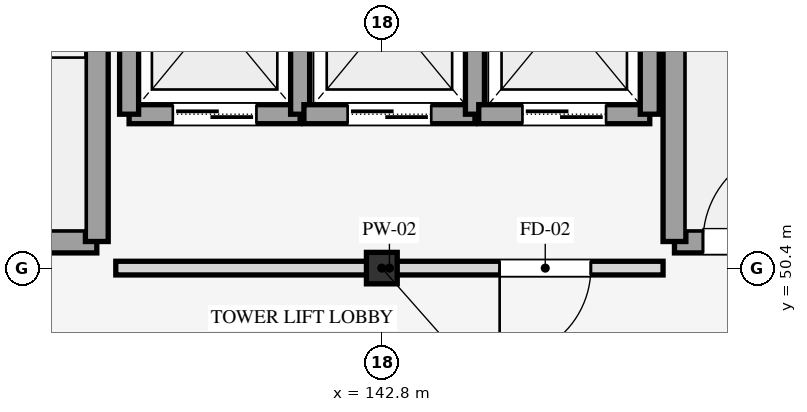
"""IFC4 building model, lengths in metres.
Left out: names, types, materials, properties, quantities, classifications, styles, units other than length and angle.
Written with IfcOpenShell. Run it as: python <this file> out.ifc"""

import sys

from ifc_helpers import new_model, si_unit, direction, frame, frame_2d, origin, origin_2d, place, context, subcontext, project, spatial, rectangle, i_section, extrude, element, fill, save


model = new_model("IFC4")
c1 = context("Model", 3, precision=1e-05, world=origin(), true_north=direction((0.0, 1.0)))
c2 = subcontext(c1, "Body", "Model", "MODEL_VIEW")
j1 = project(units=[si_unit("LENGTHUNIT", "METRE"), si_unit("PLANEANGLEUNIT", "RADIAN")], contexts=[c1])
p1 = place(None, origin())
s1 = spatial("IfcSite", under=j1, at=p1, CompositionType="ELEMENT")
p2 = place(p1, origin())
s2 = spatial("IfcBuilding", under=s1, at=p2, CompositionType="ELEMENT")
p3 = place(p2, frame((0.0, 0.0, 9.9)))
s3 = spatial("IfcBuildingStorey", under=s2, at=p3, CompositionType="ELEMENT", Elevation=9.9)
p4 = place(p3, frame((142.8, 50.4, 0.0), z_axis=(0.0, 0.0, 1.0), x_axis=(1.0, 0.0, 0.0)))
e1 = element("IfcColumn", 1, at=p4, inside=s3, PredefinedType="COLUMN", context=c2, shape_type="SweptSolid", body=[
    extrude(i_section(OverallWidth=0.405, OverallDepth=0.414, WebThickness=0.018, FlangeThickness=0.028, FilletRadius=0.022, at=origin_2d()), origin(), (0.0, 0.0, 1.0), 4.5),
])
p5 = place(p3, frame((135.05, 50.75, 0.0), z_axis=(0.0, 0.0, 1.0), x_axis=(1.0, 0.0, 0.0)))
e2 = element("IfcWall", 2, at=p5, inside=s3, PredefinedType="SHEAR", context=c2, shape_type="SweptSolid", body=[
    extrude(rectangle(XDim=4.0, YDim=0.3, at=frame_2d((2.0, 0.0))), origin(), (0.0, 0.0, 1.0), 4.5),
])
p6 = place(p5, frame((0.375, 0.0, 0.0)))
e3 = element("IfcOpeningElement", 3, at=p6, cuts=e2, PredefinedType="OPENING", context=c2, shape_type="SweptSolid", body=[
    extrude(rectangle(XDim=1.25, YDim=2.15, at=frame_2d((0.625, 1.075))), frame((0.0, 0.16, 0.0), z_axis=(0.0, -1.0, 0.0), x_axis=(1.0, 0.0, 0.0)), (0.0, 0.0, 1.0), 0.32),
])
p7 = place(p3, frame((139.05, 50.75, 0.0), z_axis=(0.0, 0.0, 1.0), x_axis=(0.0, 1.0, 0.0)))
e4 = element("IfcWall", 4, at=p7, inside=s3, PredefinedType="SHEAR", context=c2, shape_type="SweptSolid", body=[
    extrude(rectangle(XDim=14.3, YDim=0.3, at=frame_2d((7.15, 0.0))), origin(), (0.0, 0.0, 1.0), 4.5),
])
p8 = place(p3, frame((146.65, 50.75, 0.0), z_axis=(0.0, 0.0, 1.0), x_axis=(1.0, 0.0, 0.0)))
e5 = element("IfcWall", 5, at=p8, inside=s3, PredefinedType="SHEAR", context=c2, shape_type="SweptSolid", body=[
    extrude(rectangle(XDim=4.0, YDim=0.3, at=frame_2d((2.0, 0.0))), origin(), (0.0, 0.0, 1.0), 4.5),
])
p9 = place(p8, frame((0.375, 0.0, 0.0)))
e6 = element("IfcOpeningElement", 6, at=p9, cuts=e5, PredefinedType="OPENING", context=c2, shape_type="SweptSolid", body=[
    extrude(rectangle(XDim=1.25, YDim=2.15, at=frame_2d((0.625, 1.075))), frame((0.0, 0.16, 0.0), z_axis=(0.0, -1.0, 0.0), x_axis=(1.0, 0.0, 0.0)), (0.0, 0.0, 1.0), 0.32),
])
p10 = place(p3, frame((146.65, 50.75, 0.0), z_axis=(0.0, 0.0, 1.0), x_axis=(0.0, 1.0, 0.0)))
e7 = element("IfcWall", 7, at=p10, inside=s3, PredefinedType="SHEAR", context=c2, shape_type="SweptSolid", body=[
    extrude(rectangle(XDim=14.3, YDim=0.3, at=frame_2d((7.15, 0.0))), origin(), (0.0, 0.0, 1.0), 4.5),
])
p11 = place(p3, frame((139.475, 52.425, 0.0), z_axis=(0.0, 0.0, 1.0), x_axis=(1.0, 0.0, 0.0)))
e8 = element("IfcWall", 8, at=p11, inside=s3, PredefinedType="SHEAR", context=c2, shape_type="SweptSolid", body=[
    extrude(rectangle(XDim=2.25, YDim=0.25, at=frame_2d((1.125, 0.0))), origin(), (0.0, 0.0, 1.0), 4.24),
])
p12 = place(p11, frame((0.575, 0.0, 0.0)))
e9 = element("IfcOpeningElement", 9, at=p12, cuts=e8, PredefinedType="OPENING", context=c2, shape_type="SweptSolid", body=[
    extrude(rectangle(XDim=1.1, YDim=2.15, at=frame_2d((0.55, 1.075))), frame((0.0, 0.135, 0.0), z_axis=(0.0, -1.0, 0.0), x_axis=(1.0, 0.0, 0.0)), (0.0, 0.0, 1.0), 0.27),
])
for number, where, z_axis, x_axis in (
    (10, (139.475, 52.425, 0.0), (0.0, 0.0, 1.0), (0.0, 1.0, 0.0)),
    (11, (141.725, 52.425, 0.0), (0.0, 0.0, 1.0), (0.0, 1.0, 0.0)),
):
    element("IfcWall", number, at=place(p3, frame(where, z_axis=z_axis, x_axis=x_axis)), inside=s3, PredefinedType="SHEAR", context=c2, shape_type="SweptSolid", body=[
        extrude(rectangle(XDim=2.65, YDim=0.25, at=frame_2d((1.325, 0.0))), origin(), (0.0, 0.0, 1.0), 4.24),
    ])
p13 = place(p3, frame((141.775, 52.425, 0.0), z_axis=(0.0, 0.0, 1.0), x_axis=(1.0, 0.0, 0.0)))
e12 = element("IfcWall", 12, at=p13, inside=s3, PredefinedType="SHEAR", context=c2, shape_type="SweptSolid", body=[
    extrude(rectangle(XDim=2.25, YDim=0.25, at=frame_2d((1.125, 0.0))), origin(), (0.0, 0.0, 1.0), 4.24),
])
p14 = place(p13, frame((0.575, 0.0, 0.0)))
e13 = element("IfcOpeningElement", 13, at=p14, cuts=e12, PredefinedType="OPENING", context=c2, shape_type="SweptSolid", body=[
    extrude(rectangle(XDim=1.1, YDim=2.15, at=frame_2d((0.55, 1.075))), frame((0.0, 0.135, 0.0), z_axis=(0.0, -1.0, 0.0), x_axis=(1.0, 0.0, 0.0)), (0.0, 0.0, 1.0), 0.27),
])
p15 = place(p3, frame((144.025, 52.425, 0.0), z_axis=(0.0, 0.0, 1.0), x_axis=(0.0, 1.0, 0.0)))
e14 = element("IfcWall", 14, at=p15, inside=s3, PredefinedType="SHEAR", context=c2, shape_type="SweptSolid", body=[
    extrude(rectangle(XDim=2.65, YDim=0.25, at=frame_2d((1.325, 0.0))), origin(), (0.0, 0.0, 1.0), 4.24),
])
p16 = place(p3, frame((144.075, 52.425, 0.0), z_axis=(0.0, 0.0, 1.0), x_axis=(1.0, 0.0, 0.0)))
e15 = element("IfcWall", 15, at=p16, inside=s3, PredefinedType="SHEAR", context=c2, shape_type="SweptSolid", body=[
    extrude(rectangle(XDim=2.25, YDim=0.25, at=frame_2d((1.125, 0.0))), origin(), (0.0, 0.0, 1.0), 4.24),
])
p17 = place(p16, frame((0.575, 0.0, 0.0)))
e16 = element("IfcOpeningElement", 16, at=p17, cuts=e15, PredefinedType="OPENING", context=c2, shape_type="SweptSolid", body=[
    extrude(rectangle(XDim=1.1, YDim=2.15, at=frame_2d((0.55, 1.075))), frame((0.0, 0.135, 0.0), z_axis=(0.0, -1.0, 0.0), x_axis=(1.0, 0.0, 0.0)), (0.0, 0.0, 1.0), 0.27),
])
p18 = place(p3, frame((146.325, 52.425, 0.0), z_axis=(0.0, 0.0, 1.0), x_axis=(0.0, 1.0, 0.0)))
e17 = element("IfcWall", 17, at=p18, inside=s3, PredefinedType="SHEAR", context=c2, shape_type="SweptSolid", body=[
    extrude(rectangle(XDim=2.65, YDim=0.25, at=frame_2d((1.325, 0.0))), origin(), (0.0, 0.0, 1.0), 4.24),
])
p19 = place(p3, frame((139.3, 50.4, 0.0), z_axis=(0.0, 0.0, 1.0), x_axis=(1.0, 0.0, 0.0)))
e18 = element("IfcWall", 18, at=p19, inside=s3, PredefinedType="PARTITIONING", context=c2, shape_type="SweptSolid", body=[
    extrude(rectangle(XDim=7.2, YDim=0.18, at=frame_2d((3.6, 0.0))), origin(), (0.0, 0.0, 1.0), 3.54),
])
p20 = place(p19, frame((5.05, 0.0, 0.0)))
e19 = element("IfcOpeningElement", 19, at=p20, cuts=e18, PredefinedType="OPENING", context=c2, shape_type="SweptSolid", body=[
    extrude(rectangle(XDim=1.2, YDim=2.15, at=frame_2d((0.6, 1.075))), frame((0.0, 0.1, 0.0), z_axis=(0.0, -1.0, 0.0), x_axis=(1.0, 0.0, 0.0)), (0.0, 0.0, 1.0), 0.2),
])
p21 = place(p9, origin())
e20 = element("IfcDoor", 20, at=p21, inside=s3, OperationType="SINGLE_SWING_RIGHT", PredefinedType="DOOR", context=c2, shape_type="SweptSolid", body=[
    extrude(rectangle(XDim=1.25, YDim=2.15, at=frame_2d((0.625, 1.075))), frame((0.0, 0.025, 0.0), z_axis=(0.0, -1.0, 0.0), x_axis=(1.0, 0.0, 0.0)), (0.0, 0.0, 1.0), 0.05),
])
fill(e6, e20)
p22 = place(p12, origin())
e21 = element("IfcDoor", 21, at=p22, inside=s3, OperationType="DOUBLE_DOOR_SLIDING", PredefinedType="DOOR", context=c2, shape_type="SweptSolid", body=[
    extrude(rectangle(XDim=1.1, YDim=2.15, at=frame_2d((0.55, 1.075))), frame((0.0, 0.025, 0.0), z_axis=(0.0, -1.0, 0.0), x_axis=(1.0, 0.0, 0.0)), (0.0, 0.0, 1.0), 0.05),
])
fill(e9, e21)
p23 = place(p14, origin())
e22 = element("IfcDoor", 22, at=p23, inside=s3, OperationType="DOUBLE_DOOR_SLIDING", PredefinedType="DOOR", context=c2, shape_type="SweptSolid", body=[
    extrude(rectangle(XDim=1.1, YDim=2.15, at=frame_2d((0.55, 1.075))), frame((0.0, 0.025, 0.0), z_axis=(0.0, -1.0, 0.0), x_axis=(1.0, 0.0, 0.0)), (0.0, 0.0, 1.0), 0.05),
])
fill(e13, e22)
p24 = place(p17, origin())
e23 = element("IfcDoor", 23, at=p24, inside=s3, OperationType="DOUBLE_DOOR_SLIDING", PredefinedType="DOOR", context=c2, shape_type="SweptSolid", body=[
    extrude(rectangle(XDim=1.1, YDim=2.15, at=frame_2d((0.55, 1.075))), frame((0.0, 0.025, 0.0), z_axis=(0.0, -1.0, 0.0), x_axis=(1.0, 0.0, 0.0)), (0.0, 0.0, 1.0), 0.05),
])
fill(e16, e23)
p25 = place(p20, frame((1.2, 0.0, 0.0), z_axis=(0.0, 0.0, 1.0), x_axis=(-1.0, 0.0, 0.0)))
e24 = element("IfcDoor", 24, at=p25, inside=s3, OperationType="SINGLE_SWING_RIGHT", PredefinedType="DOOR", context=c2, shape_type="SweptSolid", body=[
    extrude(rectangle(XDim=1.2, YDim=2.15, at=frame_2d((0.6, 1.075))), frame((0.0, 0.025, 0.0), z_axis=(0.0, -1.0, 0.0), x_axis=(1.0, 0.0, 0.0)), (0.0, 0.0, 1.0), 0.05),
])
fill(e19, e24)
save(model, sys.argv[1])
